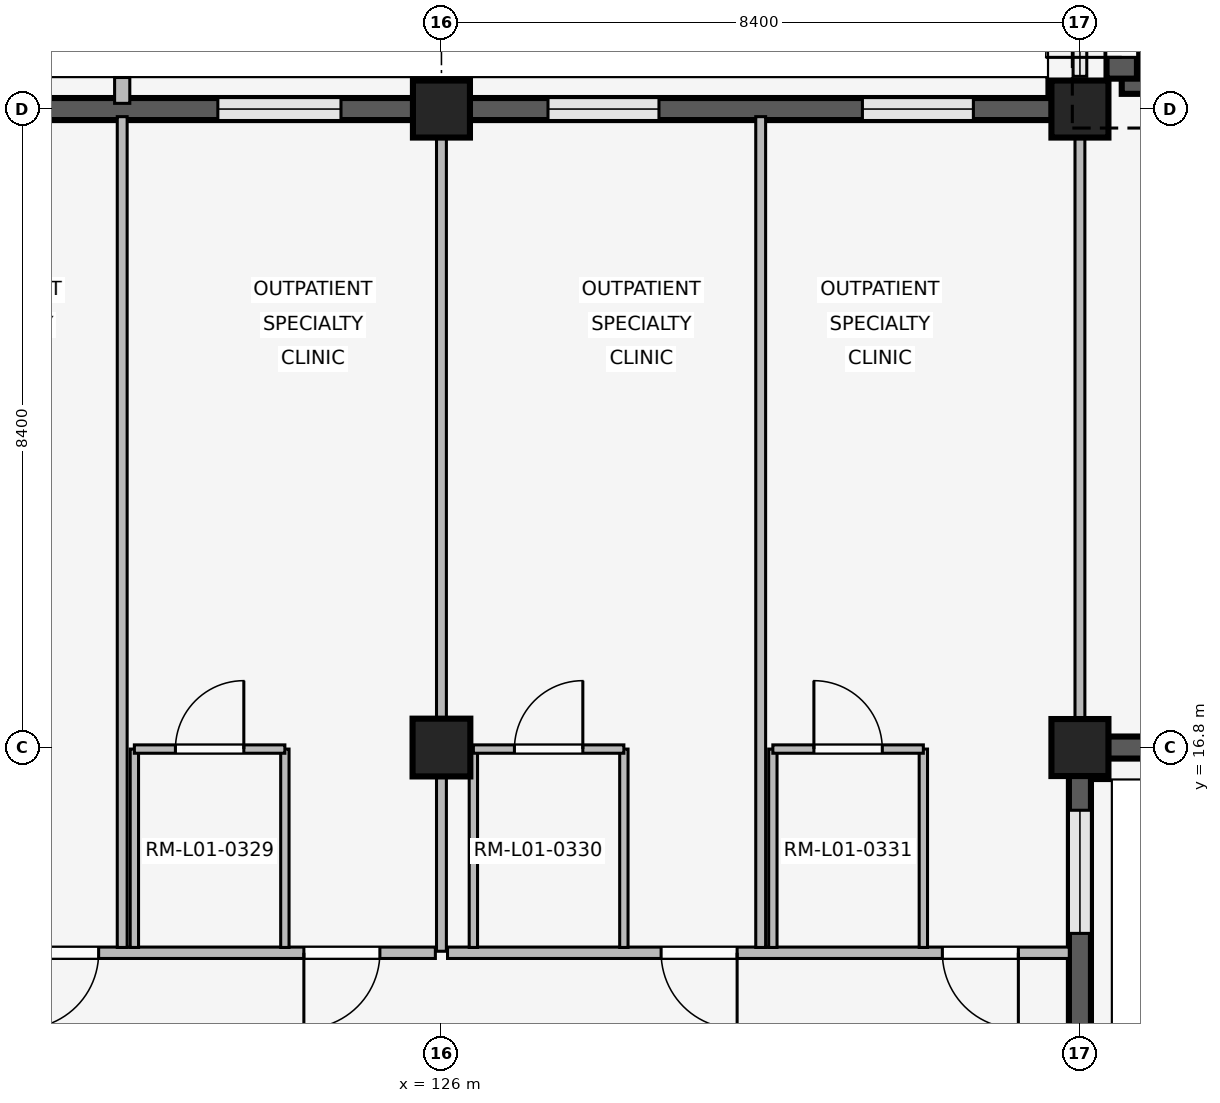
"""IFC4 building model, lengths in metres.
Left out: names, types, materials, properties, quantities, classifications, styles, units other than length and angle.
Written with IfcOpenShell. Run it as: python <this file> out.ifc"""

import sys

from ifc_helpers import new_model, si_unit, direction, frame, frame_2d, origin, origin_2d, place, context, subcontext, project, spatial, rectangle, extrude, element, fill, save


model = new_model("IFC4")
c1 = context("Model", 3, precision=1e-05, world=origin(), true_north=direction((0.0, 1.0)))
c2 = subcontext(c1, "Body", "Model", "MODEL_VIEW")
j1 = project(units=[si_unit("LENGTHUNIT", "METRE"), si_unit("PLANEANGLEUNIT", "RADIAN")], contexts=[c1])
p1 = place(None, origin())
s1 = spatial("IfcSite", under=j1, at=p1, CompositionType="ELEMENT")
p2 = place(p1, origin())
s2 = spatial("IfcBuilding", under=s1, at=p2, CompositionType="ELEMENT")
p3 = place(p2, frame((0.0, 0.0, 4.8)))
s3 = spatial("IfcBuildingStorey", under=s2, at=p3, CompositionType="ELEMENT", Elevation=4.8)
p4 = place(p3, frame((126.0, 16.8, 0.0), z_axis=(0.0, 0.0, 1.0), x_axis=(1.0, 0.0, 0.0)))
e1 = element("IfcColumn", 1, at=p4, inside=s3, PredefinedType="COLUMN", context=c2, shape_type="SweptSolid", body=[
    extrude(rectangle(XDim=0.76, YDim=0.76, at=origin_2d()), origin(), (0.0, 0.0, 1.0), 3.3),
])
for number, where, z_axis, x_axis in (
    (2, (126.0, 25.2, 0.0), (0.0, 0.0, 1.0), (1.0, 0.0, 0.0)),
    (3, (134.4, 16.8, 0.0), (0.0, 0.0, 1.0), (1.0, 0.0, 0.0)),
    (4, (134.4, 25.2, 0.0), (0.0, 0.0, 1.0), (1.0, 0.0, 0.0)),
):
    element("IfcColumn", number, at=place(p3, frame(where, z_axis=z_axis, x_axis=x_axis)), inside=s3, PredefinedType="COLUMN", context=c2, shape_type="SweptSolid", body=[
        extrude(rectangle(XDim=0.75, YDim=0.75, at=origin_2d()), origin(), (0.0, 0.0, 1.0), 3.3),
    ])
p5 = place(p3, frame((117.97, 25.2, 0.0), z_axis=(0.0, 0.0, 1.0), x_axis=(1.0, 0.0, 0.0)))
e5 = element("IfcWall", 5, at=p5, inside=s3, PredefinedType="SOLIDWALL", context=c2, shape_type="SweptSolid", body=[
    extrude(rectangle(XDim=7.66, YDim=0.29, at=frame_2d((3.83, 0.0))), origin(), (0.0, 0.0, 1.0), 2.42),
])
p6 = place(p5, frame((0.952, 0.0, 0.85)))
e6 = element("IfcOpeningElement", 6, at=p6, cuts=e5, PredefinedType="OPENING", context=c2, shape_type="SweptSolid", body=[
    extrude(rectangle(XDim=1.62, YDim=0.95, at=frame_2d((0.81, 0.475))), frame((0.0, 0.155, 0.0), z_axis=(0.0, -1.0, 0.0), x_axis=(1.0, 0.0, 0.0)), (0.0, 0.0, 1.0), 0.31),
])
p7 = place(p5, frame((5.088, 0.0, 0.85)))
e7 = element("IfcOpeningElement", 7, at=p7, cuts=e5, PredefinedType="OPENING", context=c2, shape_type="SweptSolid", body=[
    extrude(rectangle(XDim=1.62, YDim=0.95, at=frame_2d((0.81, 0.475))), frame((0.0, 0.155, 0.0), z_axis=(0.0, -1.0, 0.0), x_axis=(1.0, 0.0, 0.0)), (0.0, 0.0, 1.0), 0.31),
])
p8 = place(p3, frame((121.8, 25.275, 0.0), z_axis=(0.0, 0.0, 1.0), x_axis=(0.0, 1.0, 0.0)))
e8 = element("IfcWall", 8, at=p8, inside=s3, PredefinedType="ELEMENTEDWALL", context=c2, shape_type="SweptSolid", body=[
    extrude(rectangle(XDim=0.34, YDim=0.2, at=frame_2d((0.17, 0.0))), origin(), (0.0, 0.0, 1.0), 2.4),
])
p9 = place(p3, frame((134.4, 16.43, 0.0), z_axis=(0.0, 0.0, 1.0), x_axis=(0.0, -1.0, 0.0)))
e9 = element("IfcWall", 9, at=p9, inside=s3, PredefinedType="SOLIDWALL", context=c2, shape_type="SweptSolid", body=[
    extrude(rectangle(XDim=7.66, YDim=0.29, at=frame_2d((3.83, 0.0))), origin(), (0.0, 0.0, 1.0), 2.42),
])
p10 = place(p9, frame((0.455, 0.0, 0.85)))
e10 = element("IfcOpeningElement", 10, at=p10, cuts=e9, PredefinedType="OPENING", context=c2, shape_type="SweptSolid", body=[
    extrude(rectangle(XDim=1.62, YDim=0.95, at=frame_2d((0.81, 0.475))), frame((0.0, 0.155, 0.0), z_axis=(0.0, -1.0, 0.0), x_axis=(1.0, 0.0, 0.0)), (0.0, 0.0, 1.0), 0.31),
])
p11 = place(p9, frame((5.585, 0.0, 0.85)))
e11 = element("IfcOpeningElement", 11, at=p11, cuts=e9, PredefinedType="OPENING", context=c2, shape_type="SweptSolid", body=[
    extrude(rectangle(XDim=1.62, YDim=0.95, at=frame_2d((0.81, 0.475))), frame((0.0, 0.155, 0.0), z_axis=(0.0, -1.0, 0.0), x_axis=(1.0, 0.0, 0.0)), (0.0, 0.0, 1.0), 0.31),
])
p12 = place(p3, frame((126.37, 25.2, 0.0), z_axis=(0.0, 0.0, 1.0), x_axis=(1.0, 0.0, 0.0)))
e12 = element("IfcWall", 12, at=p12, inside=s3, PredefinedType="SOLIDWALL", context=c2, shape_type="SweptSolid", body=[
    extrude(rectangle(XDim=7.66, YDim=0.29, at=frame_2d((3.83, 0.0))), origin(), (0.0, 0.0, 1.0), 2.42),
])
p13 = place(p12, frame((1.032, 0.0, 0.85)))
e13 = element("IfcOpeningElement", 13, at=p13, cuts=e12, PredefinedType="OPENING", context=c2, shape_type="SweptSolid", body=[
    extrude(rectangle(XDim=1.46, YDim=0.85, at=frame_2d((0.73, 0.425))), frame((0.0, 0.155, 0.0), z_axis=(0.0, -1.0, 0.0), x_axis=(1.0, 0.0, 0.0)), (0.0, 0.0, 1.0), 0.31),
])
p14 = place(p12, frame((5.168, 0.0, 0.85)))
e14 = element("IfcOpeningElement", 14, at=p14, cuts=e12, PredefinedType="OPENING", context=c2, shape_type="SweptSolid", body=[
    extrude(rectangle(XDim=1.46, YDim=0.85, at=frame_2d((0.73, 0.425))), frame((0.0, 0.155, 0.0), z_axis=(0.0, -1.0, 0.0), x_axis=(1.0, 0.0, 0.0)), (0.0, 0.0, 1.0), 0.31),
])
p15 = place(p3, frame((142.43, 16.8, 0.0), z_axis=(0.0, 0.0, 1.0), x_axis=(-1.0, 0.0, 0.0)))
e15 = element("IfcWall", 15, at=p15, inside=s3, PredefinedType="SOLIDWALL", context=c2, shape_type="SweptSolid", body=[
    extrude(rectangle(XDim=7.66, YDim=0.29, at=frame_2d((3.83, 0.0))), origin(), (0.0, 0.0, 1.0), 2.42),
])
p16 = place(p15, frame((1.088, 0.0, 1.05)))
e16 = element("IfcOpeningElement", 16, at=p16, cuts=e15, PredefinedType="OPENING", context=c2, shape_type="SweptSolid", body=[
    extrude(rectangle(XDim=1.5, YDim=0.75, at=frame_2d((0.75, 0.375))), frame((0.0, 0.155, 0.0), z_axis=(0.0, -1.0, 0.0), x_axis=(1.0, 0.0, 0.0)), (0.0, 0.0, 1.0), 0.31),
])
p17 = place(p15, frame((5.072, 0.0, 1.05)))
e17 = element("IfcOpeningElement", 17, at=p17, cuts=e15, PredefinedType="OPENING", context=c2, shape_type="SweptSolid", body=[
    extrude(rectangle(XDim=1.5, YDim=0.75, at=frame_2d((0.75, 0.375))), frame((0.0, 0.155, 0.0), z_axis=(0.0, -1.0, 0.0), x_axis=(1.0, 0.0, 0.0)), (0.0, 0.0, 1.0), 0.31),
])
p18 = place(p3, frame((134.95, 25.6, 0.0), z_axis=(0.0, 0.0, 1.0), x_axis=(1.0, 0.0, 0.0)))
e18 = element("IfcWall", 18, at=p18, inside=s3, PredefinedType="SHEAR", context=c2, shape_type="SweptSolid", body=[
    extrude(rectangle(XDim=7.5, YDim=0.4, at=frame_2d((3.75, 0.0))), origin(), (0.0, 0.0, 1.0), 3.02),
])
p19 = place(p18, frame((4.85, 0.0, 0.0)))
e19 = element("IfcOpeningElement", 19, at=p19, cuts=e18, PredefinedType="OPENING", context=c2, shape_type="SweptSolid", body=[
    extrude(rectangle(XDim=1.2, YDim=2.1, at=frame_2d((0.6, 1.05))), frame((0.0, 0.21, 0.0), z_axis=(0.0, -1.0, 0.0), x_axis=(1.0, 0.0, 0.0)), (0.0, 0.0, 1.0), 0.42),
])
p20 = place(p3, frame((134.95, 25.6, 0.0), z_axis=(0.0, 0.0, 1.0), x_axis=(0.0, 1.0, 0.0)))
e20 = element("IfcWall", 20, at=p20, inside=s3, PredefinedType="SHEAR", context=c2, shape_type="SweptSolid", body=[
    extrude(rectangle(XDim=7.55, YDim=0.4, at=frame_2d((3.775, 0.0))), origin(), (0.0, 0.0, 1.0), 3.02),
])
p21 = place(p20, frame((0.28, 0.0, 0.0)))
e21 = element("IfcOpeningElement", 21, at=p21, cuts=e20, PredefinedType="OPENING", context=c2, shape_type="SweptSolid", body=[
    extrude(rectangle(XDim=1.0, YDim=2.15, at=frame_2d((0.5, 1.075))), frame((0.0, 0.21, 0.0), z_axis=(0.0, -1.0, 0.0), x_axis=(1.0, 0.0, 0.0)), (0.0, 0.0, 1.0), 0.42),
])
p22 = place(p3, frame((125.92, 14.1, 0.0), z_axis=(0.0, 0.0, 1.0), x_axis=(-1.0, 0.0, 0.0)))
e22 = element("IfcWall", 22, at=p22, inside=s3, PredefinedType="PARTITIONING", context=c2, shape_type="SweptSolid", body=[
    extrude(rectangle(XDim=8.24, YDim=0.15, at=frame_2d((4.12, 0.0))), origin(), (0.0, 0.0, 1.0), 2.4),
])
p23 = place(p22, frame((0.73, 0.0, 0.0)))
e23 = element("IfcOpeningElement", 23, at=p23, cuts=e22, PredefinedType="OPENING", context=c2, shape_type="SweptSolid", body=[
    extrude(rectangle(XDim=1.0, YDim=2.15, at=frame_2d((0.5, 1.075))), frame((0.0, 0.085, 0.0), z_axis=(0.0, -1.0, 0.0), x_axis=(1.0, 0.0, 0.0)), (0.0, 0.0, 1.0), 0.17),
])
p24 = place(p22, frame((4.43, 0.0, 0.0)))
e24 = element("IfcOpeningElement", 24, at=p24, cuts=e22, PredefinedType="OPENING", context=c2, shape_type="SweptSolid", body=[
    extrude(rectangle(XDim=1.0, YDim=2.15, at=frame_2d((0.5, 1.075))), frame((0.0, 0.085, 0.0), z_axis=(0.0, -1.0, 0.0), x_axis=(1.0, 0.0, 0.0)), (0.0, 0.0, 1.0), 0.17),
])
p25 = place(p3, frame((121.8, 14.17, 0.0), z_axis=(0.0, 0.0, 1.0), x_axis=(0.0, 1.0, 0.0)))
e25 = element("IfcWall", 25, at=p25, inside=s3, PredefinedType="PARTITIONING", context=c2, shape_type="SweptSolid", body=[
    extrude(rectangle(XDim=10.93, YDim=0.13, at=frame_2d((5.465, 0.0))), origin(), (0.0, 0.0, 1.0), 2.4),
])
for number, where, z_axis, x_axis in (
    (26, (121.96, 14.17, 0.0), (0.0, 0.0, 1.0), (0.0, 1.0, 0.0)),
    (27, (123.94, 14.17, 0.0), (0.0, 0.0, 1.0), (0.0, 1.0, 0.0)),
):
    element("IfcWall", number, at=place(p3, frame(where, z_axis=z_axis, x_axis=x_axis)), inside=s3, PredefinedType="PARTITIONING", context=c2, shape_type="SweptSolid", body=[
        extrude(rectangle(XDim=2.61, YDim=0.11, at=frame_2d((1.305, 0.0))), origin(), (0.0, 0.0, 1.0), 2.4),
    ])
p26 = place(p3, frame((121.96, 16.78, 0.0), z_axis=(0.0, 0.0, 1.0), x_axis=(1.0, 0.0, 0.0)))
e28 = element("IfcWall", 28, at=p26, inside=s3, PredefinedType="PARTITIONING", context=c2, shape_type="SweptSolid", body=[
    extrude(rectangle(XDim=1.98, YDim=0.11, at=frame_2d((0.99, 0.0))), origin(), (0.0, 0.0, 1.0), 2.4),
])
p27 = place(p26, frame((0.54, 0.0, 0.0)))
e29 = element("IfcOpeningElement", 29, at=p27, cuts=e28, PredefinedType="OPENING", context=c2, shape_type="SweptSolid", body=[
    extrude(rectangle(XDim=0.9, YDim=2.1, at=frame_2d((0.45, 1.05))), frame((0.0, 0.065, 0.0), z_axis=(0.0, -1.0, 0.0), x_axis=(1.0, 0.0, 0.0)), (0.0, 0.0, 1.0), 0.13),
])
p28 = place(p3, frame((126.0, 14.12, 0.0), z_axis=(0.0, 0.0, 1.0), x_axis=(0.0, 1.0, 0.0)))
e30 = element("IfcWall", 30, at=p28, inside=s3, PredefinedType="PARTITIONING", context=c2, shape_type="SweptSolid", body=[
    extrude(rectangle(XDim=10.94, YDim=0.13, at=frame_2d((5.47, 0.0))), origin(), (0.0, 0.0, 1.0), 2.4),
])
p29 = place(p3, frame((134.4, 17.18, 0.0), z_axis=(0.0, 0.0, 1.0), x_axis=(0.0, 1.0, 0.0)))
e31 = element("IfcWall", 31, at=p29, inside=s3, PredefinedType="PARTITIONING", context=c2, shape_type="SweptSolid", body=[
    extrude(rectangle(XDim=7.88, YDim=0.13, at=frame_2d((3.94, 0.0))), origin(), (0.0, 0.0, 1.0), 2.4),
])
p30 = place(p3, frame((134.26, 14.1, 0.0), z_axis=(0.0, 0.0, 1.0), x_axis=(-1.0, 0.0, 0.0)))
e32 = element("IfcWall", 32, at=p30, inside=s3, PredefinedType="PARTITIONING", context=c2, shape_type="SweptSolid", body=[
    extrude(rectangle(XDim=8.18, YDim=0.15, at=frame_2d((4.09, 0.0))), origin(), (0.0, 0.0, 1.0), 2.4),
])
p31 = place(p30, frame((0.67, 0.0, 0.0)))
e33 = element("IfcOpeningElement", 33, at=p31, cuts=e32, PredefinedType="OPENING", context=c2, shape_type="SweptSolid", body=[
    extrude(rectangle(XDim=1.0, YDim=2.15, at=frame_2d((0.5, 1.075))), frame((0.0, 0.085, 0.0), z_axis=(0.0, -1.0, 0.0), x_axis=(1.0, 0.0, 0.0)), (0.0, 0.0, 1.0), 0.17),
])
p32 = place(p30, frame((4.37, 0.0, 0.0)))
e34 = element("IfcOpeningElement", 34, at=p32, cuts=e32, PredefinedType="OPENING", context=c2, shape_type="SweptSolid", body=[
    extrude(rectangle(XDim=1.0, YDim=2.15, at=frame_2d((0.5, 1.075))), frame((0.0, 0.085, 0.0), z_axis=(0.0, -1.0, 0.0), x_axis=(1.0, 0.0, 0.0)), (0.0, 0.0, 1.0), 0.17),
])
p33 = place(p3, frame((130.2, 14.17, 0.0), z_axis=(0.0, 0.0, 1.0), x_axis=(0.0, 1.0, 0.0)))
e35 = element("IfcWall", 35, at=p33, inside=s3, PredefinedType="PARTITIONING", context=c2, shape_type="SweptSolid", body=[
    extrude(rectangle(XDim=10.93, YDim=0.13, at=frame_2d((5.465, 0.0))), origin(), (0.0, 0.0, 1.0), 2.4),
])
for number, where, z_axis, x_axis in (
    (36, (126.42, 14.17, 0.0), (0.0, 0.0, 1.0), (0.0, 1.0, 0.0)),
    (37, (128.4, 14.17, 0.0), (0.0, 0.0, 1.0), (0.0, 1.0, 0.0)),
):
    element("IfcWall", number, at=place(p3, frame(where, z_axis=z_axis, x_axis=x_axis)), inside=s3, PredefinedType="PARTITIONING", context=c2, shape_type="SweptSolid", body=[
        extrude(rectangle(XDim=2.61, YDim=0.11, at=frame_2d((1.305, 0.0))), origin(), (0.0, 0.0, 1.0), 2.4),
    ])
p34 = place(p3, frame((126.42, 16.78, 0.0), z_axis=(0.0, 0.0, 1.0), x_axis=(1.0, 0.0, 0.0)))
e38 = element("IfcWall", 38, at=p34, inside=s3, PredefinedType="PARTITIONING", context=c2, shape_type="SweptSolid", body=[
    extrude(rectangle(XDim=1.98, YDim=0.11, at=frame_2d((0.99, 0.0))), origin(), (0.0, 0.0, 1.0), 2.4),
])
p35 = place(p34, frame((0.54, 0.0, 0.0)))
e39 = element("IfcOpeningElement", 39, at=p35, cuts=e38, PredefinedType="OPENING", context=c2, shape_type="SweptSolid", body=[
    extrude(rectangle(XDim=0.9, YDim=2.1, at=frame_2d((0.45, 1.05))), frame((0.0, 0.065, 0.0), z_axis=(0.0, -1.0, 0.0), x_axis=(1.0, 0.0, 0.0)), (0.0, 0.0, 1.0), 0.13),
])
for number, where, z_axis, x_axis in (
    (40, (130.36, 14.17, 0.0), (0.0, 0.0, 1.0), (0.0, 1.0, 0.0)),
    (41, (132.34, 14.17, 0.0), (0.0, 0.0, 1.0), (0.0, 1.0, 0.0)),
):
    element("IfcWall", number, at=place(p3, frame(where, z_axis=z_axis, x_axis=x_axis)), inside=s3, PredefinedType="PARTITIONING", context=c2, shape_type="SweptSolid", body=[
        extrude(rectangle(XDim=2.61, YDim=0.11, at=frame_2d((1.305, 0.0))), origin(), (0.0, 0.0, 1.0), 2.4),
    ])
p36 = place(p3, frame((130.36, 16.78, 0.0), z_axis=(0.0, 0.0, 1.0), x_axis=(1.0, 0.0, 0.0)))
e42 = element("IfcWall", 42, at=p36, inside=s3, PredefinedType="PARTITIONING", context=c2, shape_type="SweptSolid", body=[
    extrude(rectangle(XDim=1.98, YDim=0.11, at=frame_2d((0.99, 0.0))), origin(), (0.0, 0.0, 1.0), 2.4),
])
p37 = place(p36, frame((0.54, 0.0, 0.0)))
e43 = element("IfcOpeningElement", 43, at=p37, cuts=e42, PredefinedType="OPENING", context=c2, shape_type="SweptSolid", body=[
    extrude(rectangle(XDim=0.9, YDim=2.1, at=frame_2d((0.45, 1.05))), frame((0.0, 0.065, 0.0), z_axis=(0.0, -1.0, 0.0), x_axis=(1.0, 0.0, 0.0)), (0.0, 0.0, 1.0), 0.13),
])
p38 = place(p7, origin())
e44 = element("IfcWindow", 44, at=p38, inside=s3, PartitioningType="SINGLE_PANEL", PredefinedType="WINDOW", context=c2, shape_type="SweptSolid", body=[
    extrude(rectangle(XDim=1.62, YDim=0.95, at=frame_2d((0.81, 0.475))), frame((0.0, 0.03, 0.0), z_axis=(0.0, -1.0, 0.0), x_axis=(1.0, 0.0, 0.0)), (0.0, 0.0, 1.0), 0.06),
])
fill(e7, e44)
p39 = place(p10, origin())
e45 = element("IfcWindow", 45, at=p39, inside=s3, PartitioningType="SINGLE_PANEL", PredefinedType="WINDOW", context=c2, shape_type="SweptSolid", body=[
    extrude(rectangle(XDim=1.62, YDim=0.95, at=frame_2d((0.81, 0.475))), frame((0.0, 0.03, 0.0), z_axis=(0.0, -1.0, 0.0), x_axis=(1.0, 0.0, 0.0)), (0.0, 0.0, 1.0), 0.06),
])
fill(e10, e45)
p40 = place(p13, origin())
e46 = element("IfcWindow", 46, at=p40, inside=s3, PartitioningType="SINGLE_PANEL", PredefinedType="WINDOW", context=c2, shape_type="SweptSolid", body=[
    extrude(rectangle(XDim=1.46, YDim=0.85, at=frame_2d((0.73, 0.425))), frame((0.0, 0.03, 0.0), z_axis=(0.0, -1.0, 0.0), x_axis=(1.0, 0.0, 0.0)), (0.0, 0.0, 1.0), 0.06),
])
fill(e13, e46)
p41 = place(p14, origin())
e47 = element("IfcWindow", 47, at=p41, inside=s3, PartitioningType="SINGLE_PANEL", PredefinedType="WINDOW", context=c2, shape_type="SweptSolid", body=[
    extrude(rectangle(XDim=1.46, YDim=0.85, at=frame_2d((0.73, 0.425))), frame((0.0, 0.03, 0.0), z_axis=(0.0, -1.0, 0.0), x_axis=(1.0, 0.0, 0.0)), (0.0, 0.0, 1.0), 0.06),
])
fill(e14, e47)
p42 = place(p21, origin())
e48 = element("IfcDoor", 48, at=p42, inside=s3, OperationType="SINGLE_SWING_LEFT", PredefinedType="DOOR", context=c2, shape_type="SweptSolid", body=[
    extrude(rectangle(XDim=1.0, YDim=2.15, at=frame_2d((0.5, 1.075))), frame((0.0, 0.025, 0.0), z_axis=(0.0, -1.0, 0.0), x_axis=(1.0, 0.0, 0.0)), (0.0, 0.0, 1.0), 0.05),
])
fill(e21, e48)
p43 = place(p23, origin())
e49 = element("IfcDoor", 49, at=p43, inside=s3, OperationType="SINGLE_SWING_RIGHT", PredefinedType="DOOR", context=c2, shape_type="SweptSolid", body=[
    extrude(rectangle(XDim=1.0, YDim=2.15, at=frame_2d((0.5, 1.075))), frame((0.0, 0.025, 0.0), z_axis=(0.0, -1.0, 0.0), x_axis=(1.0, 0.0, 0.0)), (0.0, 0.0, 1.0), 0.05),
])
fill(e23, e49)
p44 = place(p24, origin())
e50 = element("IfcDoor", 50, at=p44, inside=s3, OperationType="SINGLE_SWING_RIGHT", PredefinedType="DOOR", context=c2, shape_type="SweptSolid", body=[
    extrude(rectangle(XDim=1.0, YDim=2.15, at=frame_2d((0.5, 1.075))), frame((0.0, 0.025, 0.0), z_axis=(0.0, -1.0, 0.0), x_axis=(1.0, 0.0, 0.0)), (0.0, 0.0, 1.0), 0.05),
])
fill(e24, e50)
p45 = place(p27, origin())
e51 = element("IfcDoor", 51, at=p45, inside=s3, OperationType="SINGLE_SWING_RIGHT", PredefinedType="DOOR", context=c2, shape_type="SweptSolid", body=[
    extrude(rectangle(XDim=0.9, YDim=2.1, at=frame_2d((0.45, 1.05))), frame((0.0, 0.025, 0.0), z_axis=(0.0, -1.0, 0.0), x_axis=(1.0, 0.0, 0.0)), (0.0, 0.0, 1.0), 0.05),
])
fill(e29, e51)
p46 = place(p31, origin())
e52 = element("IfcDoor", 52, at=p46, inside=s3, OperationType="SINGLE_SWING_LEFT", PredefinedType="DOOR", context=c2, shape_type="SweptSolid", body=[
    extrude(rectangle(XDim=1.0, YDim=2.15, at=frame_2d((0.5, 1.075))), frame((0.0, 0.025, 0.0), z_axis=(0.0, -1.0, 0.0), x_axis=(1.0, 0.0, 0.0)), (0.0, 0.0, 1.0), 0.05),
])
fill(e33, e52)
p47 = place(p32, origin())
e53 = element("IfcDoor", 53, at=p47, inside=s3, OperationType="SINGLE_SWING_LEFT", PredefinedType="DOOR", context=c2, shape_type="SweptSolid", body=[
    extrude(rectangle(XDim=1.0, YDim=2.15, at=frame_2d((0.5, 1.075))), frame((0.0, 0.025, 0.0), z_axis=(0.0, -1.0, 0.0), x_axis=(1.0, 0.0, 0.0)), (0.0, 0.0, 1.0), 0.05),
])
fill(e34, e53)
p48 = place(p35, origin())
e54 = element("IfcDoor", 54, at=p48, inside=s3, OperationType="SINGLE_SWING_RIGHT", PredefinedType="DOOR", context=c2, shape_type="SweptSolid", body=[
    extrude(rectangle(XDim=0.9, YDim=2.1, at=frame_2d((0.45, 1.05))), frame((0.0, 0.025, 0.0), z_axis=(0.0, -1.0, 0.0), x_axis=(1.0, 0.0, 0.0)), (0.0, 0.0, 1.0), 0.05),
])
fill(e39, e54)
p49 = place(p37, origin())
e55 = element("IfcDoor", 55, at=p49, inside=s3, OperationType="SINGLE_SWING_LEFT", PredefinedType="DOOR", context=c2, shape_type="SweptSolid", body=[
    extrude(rectangle(XDim=0.9, YDim=2.1, at=frame_2d((0.45, 1.05))), frame((0.0, 0.025, 0.0), z_axis=(0.0, -1.0, 0.0), x_axis=(1.0, 0.0, 0.0)), (0.0, 0.0, 1.0), 0.05),
])
fill(e43, e55)
save(model, sys.argv[1])
